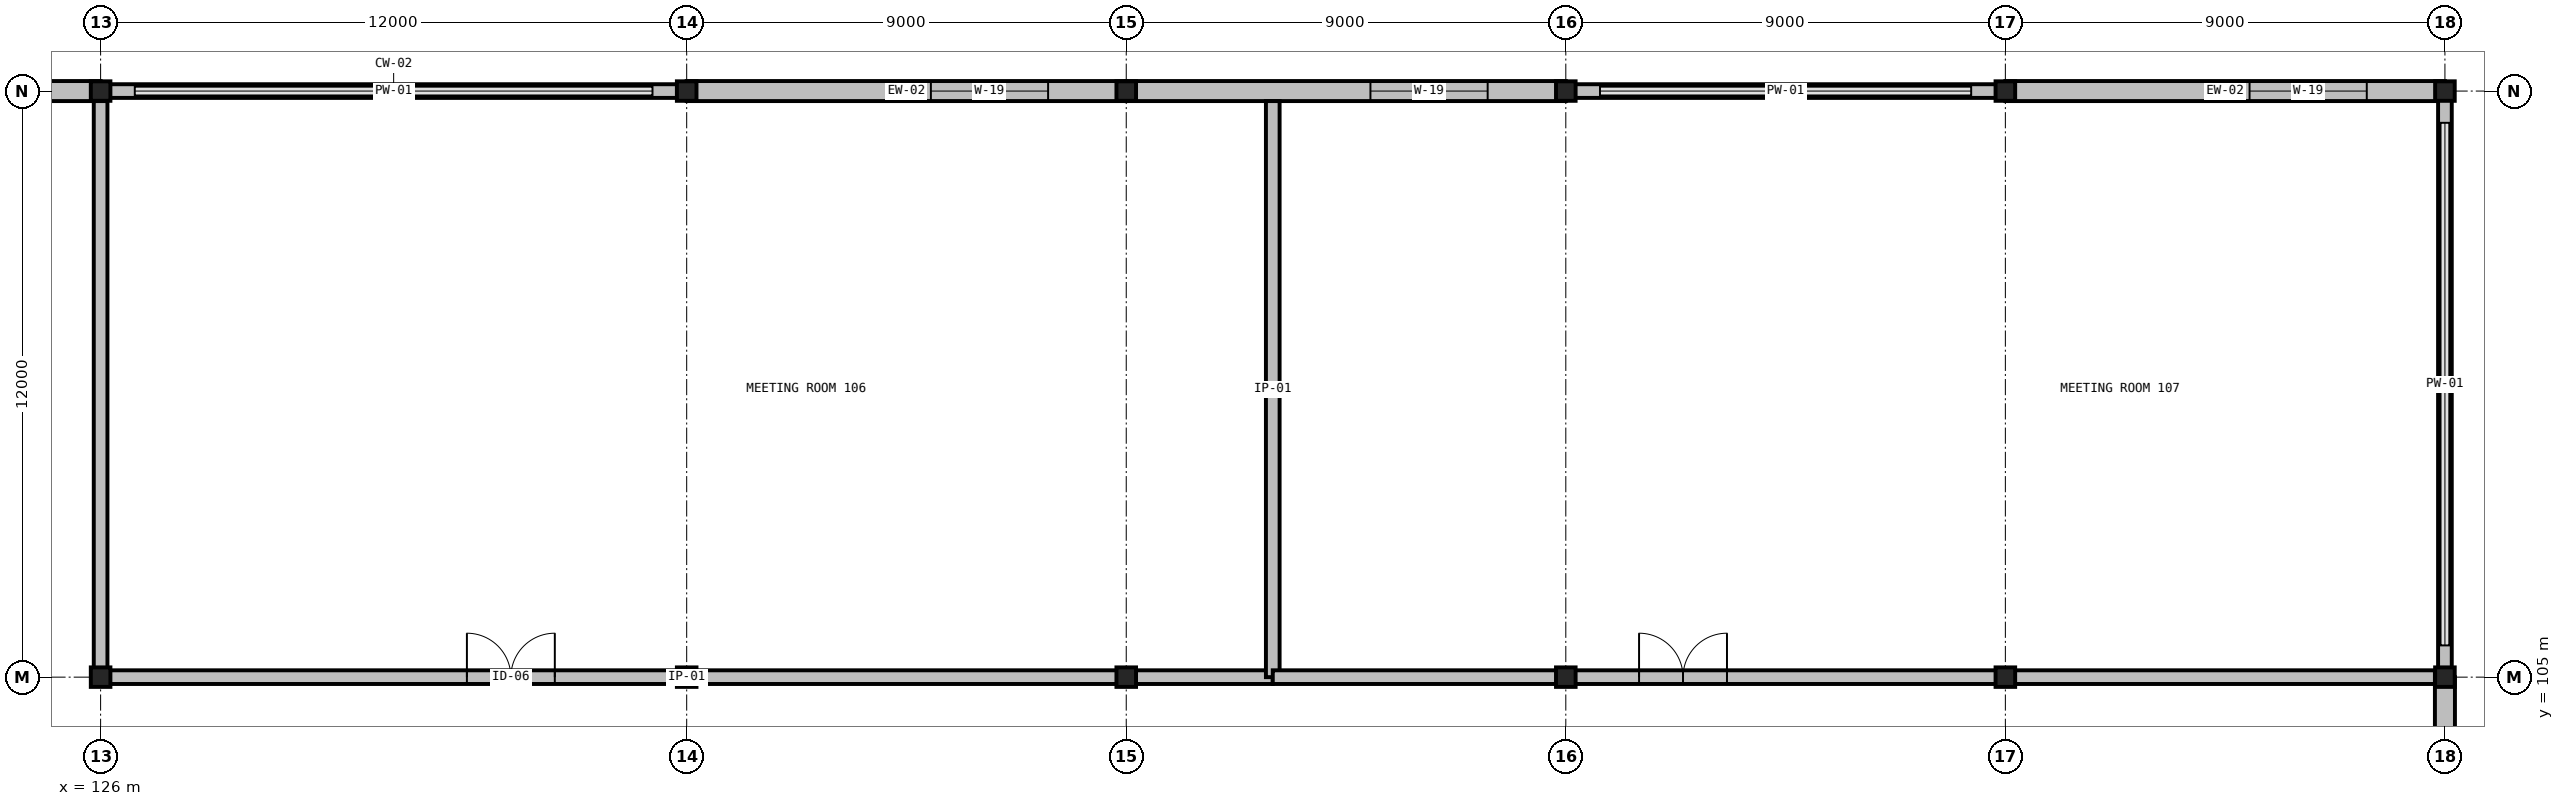
"""IFC4 building model, lengths in metres.
Left out: names, types, materials, properties, quantities, classifications, styles, units other than length and angle.
Written with IfcOpenShell. Run it as: python <this file> out.ifc"""

import sys

from ifc_helpers import new_model, si_unit, direction, frame, frame_2d, origin, origin_2d, place, context, subcontext, project, spatial, rectangle, i_section, extrude, element, fill, save


model = new_model("IFC4")
c1 = context("Model", 3, precision=1e-05, world=origin(), true_north=direction((0.0, 1.0)))
c2 = subcontext(c1, "Body", "Model", "MODEL_VIEW")
j1 = project(units=[si_unit("LENGTHUNIT", "METRE"), si_unit("PLANEANGLEUNIT", "RADIAN")], contexts=[c1])
p1 = place(None, origin())
s1 = spatial("IfcSite", under=j1, at=p1, CompositionType="ELEMENT")
p2 = place(p1, origin())
s2 = spatial("IfcBuilding", under=s1, at=p2, CompositionType="ELEMENT")
p3 = place(p2, frame((0.0, 0.0, 6.0)))
s3 = spatial("IfcBuildingStorey", under=s2, at=p3, CompositionType="ELEMENT", Elevation=6.0)
for number, where, z_axis, x_axis in (
    (1, (126.0, 105.0, 0.0), (0.0, 0.0, 1.0), (1.0, 0.0, 0.0)),
    (2, (126.0, 117.0, 0.0), (0.0, 0.0, 1.0), (1.0, 0.0, 0.0)),
    (3, (138.0, 105.0, 0.0), (0.0, 0.0, 1.0), (1.0, 0.0, 0.0)),
    (4, (138.0, 117.0, 0.0), (0.0, 0.0, 1.0), (1.0, 0.0, 0.0)),
    (5, (147.0, 105.0, 0.0), (0.0, 0.0, 1.0), (1.0, 0.0, 0.0)),
    (6, (147.0, 117.0, 0.0), (0.0, 0.0, 1.0), (1.0, 0.0, 0.0)),
    (7, (156.0, 105.0, 0.0), (0.0, 0.0, 1.0), (1.0, 0.0, 0.0)),
    (8, (156.0, 117.0, 0.0), (0.0, 0.0, 1.0), (1.0, 0.0, 0.0)),
    (9, (165.0, 105.0, 0.0), (0.0, 0.0, 1.0), (1.0, 0.0, 0.0)),
    (10, (165.0, 117.0, 0.0), (0.0, 0.0, 1.0), (1.0, 0.0, 0.0)),
    (11, (174.0, 105.0, 0.0), (0.0, 0.0, 1.0), (1.0, 0.0, 0.0)),
    (12, (174.0, 117.0, 0.0), (0.0, 0.0, 1.0), (1.0, 0.0, 0.0)),
):
    element("IfcColumn", number, at=place(p3, frame(where, z_axis=z_axis, x_axis=x_axis)), inside=s3, PredefinedType="COLUMN", context=c2, shape_type="SweptSolid", body=[
        extrude(i_section(OverallWidth=0.401, OverallDepth=0.399, WebThickness=0.025, FlangeThickness=0.04, FilletRadius=0.031, at=origin_2d()), origin(), (0.0, 0.0, 1.0), 6.0),
    ])
p4 = place(p3, frame((126.0, 117.0, 0.0), z_axis=(0.0, 0.0, 1.0), x_axis=(-1.0, 0.0, 0.0)))
e13 = element("IfcWall", 13, at=p4, inside=s3, PredefinedType="STANDARD", context=c2, shape_type="SweptSolid", body=[
    extrude(rectangle(XDim=12.0, YDim=0.41, at=frame_2d((6.0, 0.0))), origin(), (0.0, 0.0, 1.0), 4.676),
])
p5 = place(p4, frame((1.6, 0.0, 0.9)))
e14 = element("IfcOpeningElement", 14, at=p5, cuts=e13, PredefinedType="OPENING", context=c2, shape_type="SweptSolid", body=[
    extrude(rectangle(XDim=2.4, YDim=2.15, at=frame_2d((1.2, 1.075))), frame((0.0, 0.22, 0.0), z_axis=(0.0, -1.0, 0.0), x_axis=(1.0, 0.0, 0.0)), (0.0, 0.0, 1.0), 0.44),
])
p6 = place(p3, frame((138.0, 117.0, 0.0), z_axis=(0.0, 0.0, 1.0), x_axis=(-1.0, 0.0, 0.0)))
e15 = element("IfcWall", 15, at=p6, inside=s3, PredefinedType="PARAPET", context=c2, shape_type="SweptSolid", body=[
    extrude(rectangle(XDim=12.0, YDim=0.28, at=frame_2d((6.0, 0.0))), origin(), (0.0, 0.0, 1.0), 0.2),
])
p7 = place(p3, frame((147.0, 117.0, 0.0), z_axis=(0.0, 0.0, 1.0), x_axis=(-1.0, 0.0, 0.0)))
e16 = element("IfcWall", 16, at=p7, inside=s3, PredefinedType="STANDARD", context=c2, shape_type="SweptSolid", body=[
    extrude(rectangle(XDim=9.0, YDim=0.41, at=frame_2d((4.5, 0.0))), origin(), (0.0, 0.0, 1.0), 4.676),
])
p8 = place(p7, frame((1.6, 0.0, 0.9)))
e17 = element("IfcOpeningElement", 17, at=p8, cuts=e16, PredefinedType="OPENING", context=c2, shape_type="SweptSolid", body=[
    extrude(rectangle(XDim=2.4, YDim=2.15, at=frame_2d((1.2, 1.075))), frame((0.0, 0.22, 0.0), z_axis=(0.0, -1.0, 0.0), x_axis=(1.0, 0.0, 0.0)), (0.0, 0.0, 1.0), 0.44),
])
p9 = place(p3, frame((156.0, 117.0, 0.0), z_axis=(0.0, 0.0, 1.0), x_axis=(-1.0, 0.0, 0.0)))
e18 = element("IfcWall", 18, at=p9, inside=s3, PredefinedType="STANDARD", context=c2, shape_type="SweptSolid", body=[
    extrude(rectangle(XDim=9.0, YDim=0.41, at=frame_2d((4.5, 0.0))), origin(), (0.0, 0.0, 1.0), 4.676),
])
p10 = place(p9, frame((1.6, 0.0, 0.9)))
e19 = element("IfcOpeningElement", 19, at=p10, cuts=e18, PredefinedType="OPENING", context=c2, shape_type="SweptSolid", body=[
    extrude(rectangle(XDim=2.4, YDim=2.15, at=frame_2d((1.2, 1.075))), frame((0.0, 0.22, 0.0), z_axis=(0.0, -1.0, 0.0), x_axis=(1.0, 0.0, 0.0)), (0.0, 0.0, 1.0), 0.44),
])
p11 = place(p3, frame((165.0, 117.0, 0.0), z_axis=(0.0, 0.0, 1.0), x_axis=(-1.0, 0.0, 0.0)))
e20 = element("IfcWall", 20, at=p11, inside=s3, PredefinedType="PARAPET", context=c2, shape_type="SweptSolid", body=[
    extrude(rectangle(XDim=9.0, YDim=0.28, at=frame_2d((4.5, 0.0))), origin(), (0.0, 0.0, 1.0), 0.2),
])
p12 = place(p3, frame((174.0, 117.0, 0.0), z_axis=(0.0, 0.0, 1.0), x_axis=(-1.0, 0.0, 0.0)))
e21 = element("IfcWall", 21, at=p12, inside=s3, PredefinedType="STANDARD", context=c2, shape_type="SweptSolid", body=[
    extrude(rectangle(XDim=9.0, YDim=0.41, at=frame_2d((4.5, 0.0))), origin(), (0.0, 0.0, 1.0), 4.676),
])
p13 = place(p12, frame((1.6, 0.0, 0.9)))
e22 = element("IfcOpeningElement", 22, at=p13, cuts=e21, PredefinedType="OPENING", context=c2, shape_type="SweptSolid", body=[
    extrude(rectangle(XDim=2.4, YDim=2.15, at=frame_2d((1.2, 1.075))), frame((0.0, 0.22, 0.0), z_axis=(0.0, -1.0, 0.0), x_axis=(1.0, 0.0, 0.0)), (0.0, 0.0, 1.0), 0.44),
])
p14 = place(p3, frame((174.0, 96.0, 0.0), z_axis=(0.0, 0.0, 1.0), x_axis=(0.0, 1.0, 0.0)))
e23 = element("IfcWall", 23, at=p14, inside=s3, PredefinedType="STANDARD", context=c2, shape_type="SweptSolid", body=[
    extrude(rectangle(XDim=9.0, YDim=0.41, at=frame_2d((4.5, 0.0))), origin(), (0.0, 0.0, 1.0), 5.269),
])
p15 = place(p3, frame((174.0, 105.0, 0.0), z_axis=(0.0, 0.0, 1.0), x_axis=(0.0, 1.0, 0.0)))
e24 = element("IfcWall", 24, at=p15, inside=s3, PredefinedType="PARAPET", context=c2, shape_type="SweptSolid", body=[
    extrude(rectangle(XDim=12.0, YDim=0.28, at=frame_2d((6.0, 0.0))), origin(), (0.0, 0.0, 1.0), 0.2),
])
p16 = place(p3, frame((126.0, 105.0, 0.0), z_axis=(0.0, 0.0, 1.0), x_axis=(1.0, 0.0, 0.0)))
e25 = element("IfcWall", 25, at=p16, inside=s3, PredefinedType="PARTITIONING", context=c2, shape_type="SweptSolid", body=[
    extrude(rectangle(XDim=24.0, YDim=0.28, at=frame_2d((12.0, 0.0))), origin(), (0.0, 0.0, 1.0), 4.902),
])
p17 = place(p16, frame((7.5, 0.0, 0.0)))
e26 = element("IfcOpeningElement", 26, at=p17, cuts=e25, PredefinedType="OPENING", context=c2, shape_type="SweptSolid", body=[
    extrude(rectangle(XDim=1.8, YDim=2.3, at=frame_2d((0.9, 1.15))), frame((0.0, 0.155, 0.0), z_axis=(0.0, -1.0, 0.0), x_axis=(1.0, 0.0, 0.0)), (0.0, 0.0, 1.0), 0.31),
])
p18 = place(p3, frame((150.0, 105.0, 0.0), z_axis=(0.0, 0.0, 1.0), x_axis=(0.0, 1.0, 0.0)))
e27 = element("IfcWall", 27, at=p18, inside=s3, PredefinedType="PARTITIONING", context=c2, shape_type="SweptSolid", body=[
    extrude(rectangle(XDim=11.795, YDim=0.28, at=frame_2d((5.897, 0.0))), origin(), (0.0, 0.0, 1.0), 5.68),
])
p19 = place(p3, frame((126.0, 116.795, 0.0), z_axis=(0.0, 0.0, 1.0), x_axis=(0.0, -1.0, 0.0)))
e28 = element("IfcWall", 28, at=p19, inside=s3, PredefinedType="PARTITIONING", context=c2, shape_type="SweptSolid", body=[
    extrude(rectangle(XDim=11.795, YDim=0.28, at=frame_2d((5.897, 0.0))), origin(), (0.0, 0.0, 1.0), 4.83),
])
p20 = place(p3, frame((150.0, 105.0, 0.0), z_axis=(0.0, 0.0, 1.0), x_axis=(1.0, 0.0, 0.0)))
e29 = element("IfcWall", 29, at=p20, inside=s3, PredefinedType="PARTITIONING", context=c2, shape_type="SweptSolid", body=[
    extrude(rectangle(XDim=23.795, YDim=0.28, at=frame_2d((11.897, 0.0))), origin(), (0.0, 0.0, 1.0), 4.987),
])
p21 = place(p20, frame((7.5, 0.0, 0.0)))
e30 = element("IfcOpeningElement", 30, at=p21, cuts=e29, PredefinedType="OPENING", context=c2, shape_type="SweptSolid", body=[
    extrude(rectangle(XDim=1.8, YDim=2.3, at=frame_2d((0.9, 1.15))), frame((0.0, 0.155, 0.0), z_axis=(0.0, -1.0, 0.0), x_axis=(1.0, 0.0, 0.0)), (0.0, 0.0, 1.0), 0.31),
])
p22 = place(p8, origin())
e31 = element("IfcWindow", 31, at=p22, inside=s3, PartitioningType="DOUBLE_PANEL_VERTICAL", PredefinedType="WINDOW", context=c2, shape_type="SweptSolid", body=[
    extrude(rectangle(XDim=2.4, YDim=2.15, at=frame_2d((1.2, 1.075))), frame((0.0, 0.03, 0.0), z_axis=(0.0, -1.0, 0.0), x_axis=(1.0, 0.0, 0.0)), (0.0, 0.0, 1.0), 0.06),
])
fill(e17, e31)
p23 = place(p10, origin())
e32 = element("IfcWindow", 32, at=p23, inside=s3, PartitioningType="DOUBLE_PANEL_VERTICAL", PredefinedType="WINDOW", context=c2, shape_type="SweptSolid", body=[
    extrude(rectangle(XDim=2.4, YDim=2.15, at=frame_2d((1.2, 1.075))), frame((0.0, 0.03, 0.0), z_axis=(0.0, -1.0, 0.0), x_axis=(1.0, 0.0, 0.0)), (0.0, 0.0, 1.0), 0.06),
])
fill(e19, e32)
p24 = place(p13, origin())
e33 = element("IfcWindow", 33, at=p24, inside=s3, PartitioningType="DOUBLE_PANEL_VERTICAL", PredefinedType="WINDOW", context=c2, shape_type="SweptSolid", body=[
    extrude(rectangle(XDim=2.4, YDim=2.15, at=frame_2d((1.2, 1.075))), frame((0.0, 0.03, 0.0), z_axis=(0.0, -1.0, 0.0), x_axis=(1.0, 0.0, 0.0)), (0.0, 0.0, 1.0), 0.06),
])
fill(e22, e33)
p25 = place(p17, origin())
e34 = element("IfcDoor", 34, at=p25, inside=s3, OperationType="DOUBLE_DOOR_SINGLE_SWING", PredefinedType="DOOR", context=c2, shape_type="SweptSolid", body=[
    extrude(rectangle(XDim=1.8, YDim=2.3, at=frame_2d((0.9, 1.15))), frame((0.0, 0.025, 0.0), z_axis=(0.0, -1.0, 0.0), x_axis=(1.0, 0.0, 0.0)), (0.0, 0.0, 1.0), 0.05),
])
fill(e26, e34)
p26 = place(p21, origin())
e35 = element("IfcDoor", 35, at=p26, inside=s3, OperationType="DOUBLE_DOOR_SINGLE_SWING", PredefinedType="DOOR", context=c2, shape_type="SweptSolid", body=[
    extrude(rectangle(XDim=1.8, YDim=2.3, at=frame_2d((0.9, 1.15))), frame((0.0, 0.025, 0.0), z_axis=(0.0, -1.0, 0.0), x_axis=(1.0, 0.0, 0.0)), (0.0, 0.0, 1.0), 0.05),
])
fill(e30, e35)
save(model, sys.argv[1])
